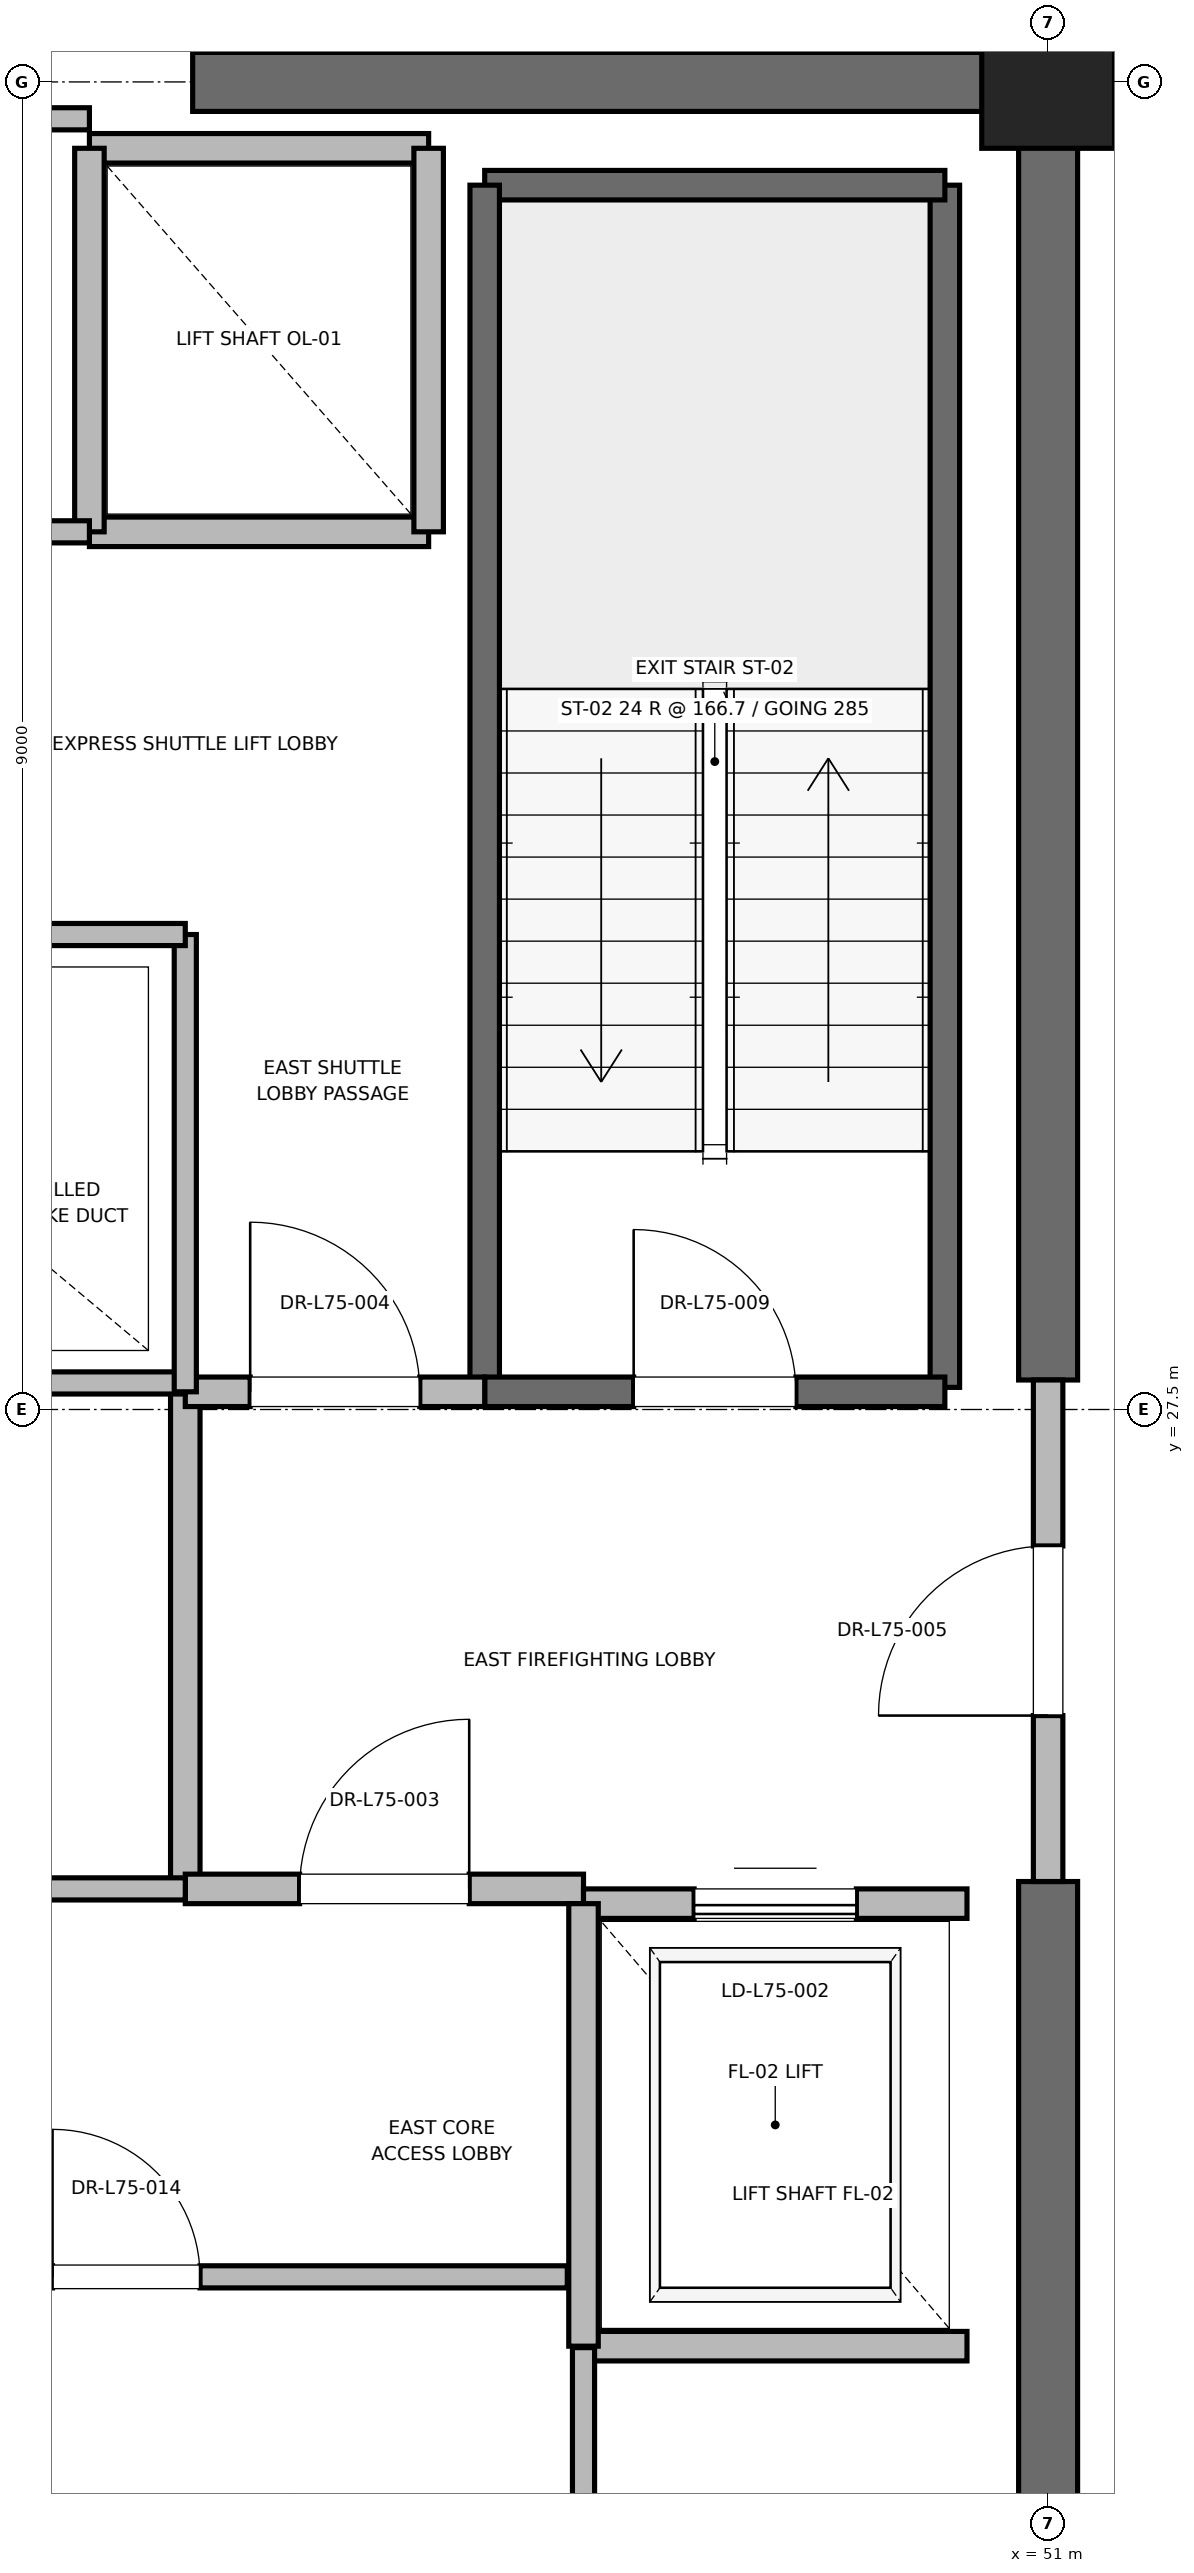
"""IFC4 building model, lengths in metres.
Left out: names, types, materials, properties, quantities, classifications, styles, units other than length and angle.
Written with IfcOpenShell. Run it as: python <this file> out.ifc"""

import sys

from ifc_helpers import new_model, si_unit, direction, frame, frame_2d, origin, origin_2d, place, context, subcontext, project, spatial, rectangle, extrude, element, fill, save


model = new_model("IFC4")
c1 = context("Model", 3, precision=1e-05, world=origin(), true_north=direction((0.0, 1.0)))
c2 = subcontext(c1, "Body", "Model", "MODEL_VIEW")
j1 = project(units=[si_unit("LENGTHUNIT", "METRE"), si_unit("PLANEANGLEUNIT", "RADIAN")], contexts=[c1])
p1 = place(None, origin())
s1 = spatial("IfcSite", under=j1, at=p1, CompositionType="ELEMENT")
p2 = place(p1, origin())
s2 = spatial("IfcBuilding", under=s1, at=p2, CompositionType="ELEMENT")
p3 = place(p2, frame((0.0, 0.0, 322.8)))
s3 = spatial("IfcBuildingStorey", under=s2, at=p3, CompositionType="ELEMENT", Elevation=322.8)
p4 = place(p3, frame((51.0, 36.5, 0.0), z_axis=(0.0, 0.0, 1.0), x_axis=(1.0, 0.0, 0.0)))
e1 = element("IfcColumn", 1, at=p4, inside=s3, PredefinedType="PILASTER", context=c2, shape_type="SweptSolid", body=[
    extrude(rectangle(XDim=0.9, YDim=0.9, at=origin_2d()), origin(), (0.0, 0.0, 1.0), 4.0),
])
for number, where, z_axis, x_axis in (
    (2, (45.2, 36.5, 0.0), (0.0, 0.0, 1.0), (1.0, 0.0, 0.0)),
    (3, (51.0, 18.5, 0.0), (0.0, 0.0, 1.0), (0.0, 1.0, 0.0)),
):
    element("IfcWall", number, at=place(p3, frame(where, z_axis=z_axis, x_axis=x_axis)), inside=s3, PredefinedType="SHEAR", context=c2, shape_type="SweptSolid", body=[
        extrude(rectangle(XDim=5.8, YDim=0.4, at=frame_2d((2.9, 0.0))), origin(), (0.0, 0.0, 1.0), 3.785),
    ])
p5 = place(p3, frame((51.0, 27.7, 0.0), z_axis=(0.0, 0.0, 1.0), x_axis=(0.0, 1.0, 0.0)))
e4 = element("IfcWall", 4, at=p5, inside=s3, PredefinedType="SHEAR", context=c2, shape_type="SweptSolid", body=[
    extrude(rectangle(XDim=8.8, YDim=0.4, at=frame_2d((4.4, 0.0))), origin(), (0.0, 0.0, 1.0), 3.785),
])
p6 = place(p3, frame((50.3, 27.65, 0.0), z_axis=(0.0, 0.0, 1.0), x_axis=(0.0, 1.0, 0.0)))
e5 = element("IfcWall", 5, at=p6, inside=s3, PredefinedType="SOLIDWALL", context=c2, shape_type="SweptSolid", body=[
    extrude(rectangle(XDim=8.15, YDim=0.2, at=frame_2d((4.075, 0.0))), origin(), (0.0, 0.0, 1.0), 3.785),
])
p7 = place(p3, frame((47.18, 35.8, 0.0), z_axis=(0.0, 0.0, 1.0), x_axis=(1.0, 0.0, 0.0)))
e6 = element("IfcWall", 6, at=p7, inside=s3, PredefinedType="SOLIDWALL", context=c2, shape_type="SweptSolid", body=[
    extrude(rectangle(XDim=3.12, YDim=0.2, at=frame_2d((1.56, 0.0))), origin(), (0.0, 0.0, 1.0), 3.785),
])
p8 = place(p3, frame((47.18, 27.62, 0.0), z_axis=(0.0, 0.0, 1.0), x_axis=(0.0, 1.0, 0.0)))
e7 = element("IfcWall", 7, at=p8, inside=s3, PredefinedType="SOLIDWALL", context=c2, shape_type="SweptSolid", body=[
    extrude(rectangle(XDim=8.18, YDim=0.2, at=frame_2d((4.09, 0.0))), origin(), (0.0, 0.0, 1.0), 3.785),
])
p9 = place(p3, frame((47.18, 27.62, 0.0), z_axis=(0.0, 0.0, 1.0), x_axis=(1.0, 0.0, 0.0)))
e8 = element("IfcWall", 8, at=p9, inside=s3, PredefinedType="SOLIDWALL", context=c2, shape_type="SweptSolid", body=[
    extrude(rectangle(XDim=3.12, YDim=0.2, at=frame_2d((1.56, 0.0))), origin(), (0.0, 0.0, 1.0), 3.785),
])
p10 = place(p9, frame((1.01, 0.0, 0.0)))
e9 = element("IfcOpeningElement", 9, at=p10, cuts=e8, PredefinedType="OPENING", context=c2, shape_type="SweptSolid", body=[
    extrude(rectangle(XDim=1.1, YDim=2.15, at=frame_2d((0.55, 1.075))), frame((0.0, 0.1, 0.0), z_axis=(0.0, -1.0, 0.0), x_axis=(1.0, 0.0, 0.0)), (0.0, 0.0, 1.0), 0.2),
])
p11 = place(p3, frame((45.15, 24.25, 0.0), z_axis=(0.0, 0.0, 1.0), x_axis=(0.0, 1.0, 0.0)))
e10 = element("IfcWall", 10, at=p11, inside=s3, PredefinedType="PARTITIONING", context=c2, shape_type="SweptSolid", body=[
    extrude(rectangle(XDim=3.37, YDim=0.2, at=frame_2d((1.685, 0.0))), origin(), (0.0, 0.0, 1.0), 3.785),
])
p12 = place(p3, frame((45.15, 24.25, 0.0), z_axis=(0.0, 0.0, 1.0), x_axis=(1.0, 0.0, 0.0)))
e11 = element("IfcWall", 11, at=p12, inside=s3, PredefinedType="PARTITIONING", context=c2, shape_type="SweptSolid", body=[
    extrude(rectangle(XDim=2.7, YDim=0.2, at=frame_2d((1.35, 0.0))), origin(), (0.0, 0.0, 1.0), 3.785),
])
p13 = place(p12, frame((0.775, 0.0, 0.0)))
e12 = element("IfcOpeningElement", 12, at=p13, cuts=e11, PredefinedType="OPENING", context=c2, shape_type="SweptSolid", body=[
    extrude(rectangle(XDim=1.15, YDim=2.2, at=frame_2d((0.575, 1.1))), frame((0.0, 0.1, 0.0), z_axis=(0.0, -1.0, 0.0), x_axis=(1.0, 0.0, 0.0)), (0.0, 0.0, 1.0), 0.2),
])
p14 = place(p3, frame((45.15, 27.62, 0.0), z_axis=(0.0, 0.0, 1.0), x_axis=(1.0, 0.0, 0.0)))
e13 = element("IfcWall", 13, at=p14, inside=s3, PredefinedType="PARTITIONING", context=c2, shape_type="SweptSolid", body=[
    extrude(rectangle(XDim=2.03, YDim=0.2, at=frame_2d((1.015, 0.0))), origin(), (0.0, 0.0, 1.0), 3.785),
])
p15 = place(p14, frame((0.44, 0.0, 0.0)))
e14 = element("IfcOpeningElement", 14, at=p15, cuts=e13, PredefinedType="OPENING", context=c2, shape_type="SweptSolid", body=[
    extrude(rectangle(XDim=1.15, YDim=2.2, at=frame_2d((0.575, 1.1))), frame((0.0, 0.1, 0.0), z_axis=(0.0, -1.0, 0.0), x_axis=(1.0, 0.0, 0.0)), (0.0, 0.0, 1.0), 0.2),
])
p16 = place(p3, frame((51.0, 24.3, 0.0), z_axis=(0.0, 0.0, 1.0), x_axis=(0.0, 1.0, 0.0)))
e15 = element("IfcWall", 15, at=p16, inside=s3, PredefinedType="PARTITIONING", context=c2, shape_type="SweptSolid", body=[
    extrude(rectangle(XDim=3.4, YDim=0.2, at=frame_2d((1.7, 0.0))), origin(), (0.0, 0.0, 1.0), 2.865),
])
p17 = place(p16, frame((1.125, 0.0, 0.0)))
e16 = element("IfcOpeningElement", 16, at=p17, cuts=e15, PredefinedType="OPENING", context=c2, shape_type="SweptSolid", body=[
    extrude(rectangle(XDim=1.15, YDim=2.2, at=frame_2d((0.575, 1.1))), frame((0.0, 0.1, 0.0), z_axis=(0.0, -1.0, 0.0), x_axis=(1.0, 0.0, 0.0)), (0.0, 0.0, 1.0), 0.2),
])
p18 = place(p3, frame((47.85, 21.15, 0.0), z_axis=(0.0, 0.0, 1.0), x_axis=(1.0, 0.0, 0.0)))
e17 = element("IfcWall", 17, at=p18, inside=s3, PredefinedType="SOLIDWALL", context=c2, shape_type="SweptSolid", body=[
    extrude(rectangle(XDim=2.6, YDim=0.2, at=frame_2d((1.3, 0.0))), origin(), (0.0, 0.0, 1.0), 3.785),
])
p19 = place(p3, frame((50.45, 24.15, 0.0), z_axis=(0.0, 0.0, 1.0), x_axis=(-1.0, 0.0, 0.0)))
e18 = element("IfcWall", 18, at=p19, inside=s3, PredefinedType="SOLIDWALL", context=c2, shape_type="SweptSolid", body=[
    extrude(rectangle(XDim=2.6, YDim=0.2, at=frame_2d((1.3, 0.0))), origin(), (0.0, 0.0, 1.0), 2.865),
])
p20 = place(p19, frame((0.75, 0.0, 0.0)))
e19 = element("IfcOpeningElement", 19, at=p20, cuts=e18, PredefinedType="OPENING", context=c2, shape_type="SweptSolid", body=[
    extrude(rectangle(XDim=1.1, YDim=2.2, at=frame_2d((0.55, 1.1))), frame((0.0, 0.1, 0.0), z_axis=(0.0, -1.0, 0.0), x_axis=(1.0, 0.0, 0.0)), (0.0, 0.0, 1.0), 0.2),
])
p21 = place(p3, frame((47.85, 24.15, 0.0), z_axis=(0.0, 0.0, 1.0), x_axis=(0.0, -1.0, 0.0)))
e20 = element("IfcWall", 20, at=p21, inside=s3, PredefinedType="SOLIDWALL", context=c2, shape_type="SweptSolid", body=[
    extrude(rectangle(XDim=3.0, YDim=0.2, at=frame_2d((1.5, 0.0))), origin(), (0.0, 0.0, 1.0), 3.785),
])
p22 = place(p3, frame((44.5, 33.45, 0.0), z_axis=(0.0, 0.0, 1.0), x_axis=(1.0, 0.0, 0.0)))
e21 = element("IfcWall", 21, at=p22, inside=s3, PredefinedType="SOLIDWALL", context=c2, shape_type="SweptSolid", body=[
    extrude(rectangle(XDim=2.3, YDim=0.2, at=frame_2d((1.15, 0.0))), origin(), (0.0, 0.0, 1.0), 3.785),
])
p23 = place(p3, frame((46.8, 36.05, 0.0), z_axis=(0.0, 0.0, 1.0), x_axis=(-1.0, 0.0, 0.0)))
e22 = element("IfcWall", 22, at=p23, inside=s3, PredefinedType="SOLIDWALL", context=c2, shape_type="SweptSolid", body=[
    extrude(rectangle(XDim=2.3, YDim=0.2, at=frame_2d((1.15, 0.0))), origin(), (0.0, 0.0, 1.0), 2.865),
])
p24 = place(p3, frame((44.5, 36.05, 0.0), z_axis=(0.0, 0.0, 1.0), x_axis=(0.0, -1.0, 0.0)))
e23 = element("IfcWall", 23, at=p24, inside=s3, PredefinedType="SOLIDWALL", context=c2, shape_type="SweptSolid", body=[
    extrude(rectangle(XDim=2.6, YDim=0.2, at=frame_2d((1.3, 0.0))), origin(), (0.0, 0.0, 1.0), 2.865),
])
p25 = place(p3, frame((46.8, 33.45, 0.0), z_axis=(0.0, 0.0, 1.0), x_axis=(0.0, 1.0, 0.0)))
e24 = element("IfcWall", 24, at=p25, inside=s3, PredefinedType="SOLIDWALL", context=c2, shape_type="SweptSolid", body=[
    extrude(rectangle(XDim=2.6, YDim=0.2, at=frame_2d((1.3, 0.0))), origin(), (0.0, 0.0, 1.0), 3.785),
])
p26 = place(p3, frame((41.56, 27.68, 0.0), z_axis=(0.0, 0.0, 1.0), x_axis=(1.0, 0.0, 0.0)))
e25 = element("IfcWall", 25, at=p26, inside=s3, PredefinedType="PARTITIONING", context=c2, shape_type="SweptSolid", body=[
    extrude(rectangle(XDim=3.59, YDim=0.15, at=frame_2d((1.795, 0.0))), origin(), (0.0, 0.0, 1.0), 2.85),
])
p27 = place(p3, frame((47.85, 18.6, 0.0), z_axis=(0.0, 0.0, 1.0), x_axis=(0.0, 1.0, 0.0)))
e26 = element("IfcWall", 26, at=p27, inside=s3, PredefinedType="PARTITIONING", context=c2, shape_type="SweptSolid", body=[
    extrude(rectangle(XDim=2.54, YDim=0.15, at=frame_2d((1.27, 0.0))), origin(), (0.0, 0.0, 1.0), 2.85),
])
p28 = place(p3, frame((41.76, 21.62, 0.0), z_axis=(0.0, 0.0, 1.0), x_axis=(1.0, 0.0, 0.0)))
e27 = element("IfcWall", 27, at=p28, inside=s3, PredefinedType="PARTITIONING", context=c2, shape_type="SweptSolid", body=[
    extrude(rectangle(XDim=5.98, YDim=0.15, at=frame_2d((2.99, 0.0))), origin(), (0.0, 0.0, 1.0), 2.85),
])
p29 = place(p28, frame((2.49, 0.0, 0.0)))
e28 = element("IfcOpeningElement", 28, at=p29, cuts=e27, PredefinedType="OPENING", context=c2, shape_type="SweptSolid", body=[
    extrude(rectangle(XDim=1.0, YDim=2.15, at=frame_2d((0.5, 1.075))), frame((0.0, 0.075, 0.0), z_axis=(0.0, -1.0, 0.0), x_axis=(1.0, 0.0, 0.0)), (0.0, 0.0, 1.0), 0.15),
])
p30 = place(p3, frame((41.76, 24.25, 0.0), z_axis=(0.0, 0.0, 1.0), x_axis=(1.0, 0.0, 0.0)))
e29 = element("IfcWall", 29, at=p30, inside=s3, PredefinedType="PARTITIONING", context=c2, shape_type="SweptSolid", body=[
    extrude(rectangle(XDim=3.39, YDim=0.15, at=frame_2d((1.695, 0.0))), origin(), (0.0, 0.0, 1.0), 2.85),
])
p31 = place(p30, frame((1.195, 0.0, 0.0)))
e30 = element("IfcOpeningElement", 30, at=p31, cuts=e29, PredefinedType="OPENING", context=c2, shape_type="SweptSolid", body=[
    extrude(rectangle(XDim=1.0, YDim=2.15, at=frame_2d((0.5, 1.075))), frame((0.0, 0.075, 0.0), z_axis=(0.0, -1.0, 0.0), x_axis=(1.0, 0.0, 0.0)), (0.0, 0.0, 1.0), 0.15),
])
p32 = place(p3, frame((45.15, 27.62, 0.0), z_axis=(0.0, 0.0, 1.0), x_axis=(0.0, 1.0, 0.0)))
e31 = element("IfcWall", 31, at=p32, inside=s3, PredefinedType="PARTITIONING", context=c2, shape_type="SweptSolid", body=[
    extrude(rectangle(XDim=3.1, YDim=0.15, at=frame_2d((1.55, 0.0))), origin(), (0.0, 0.0, 1.0), 2.85),
])
p33 = place(p3, frame((41.56, 30.72, 0.0), z_axis=(0.0, 0.0, 1.0), x_axis=(1.0, 0.0, 0.0)))
e32 = element("IfcWall", 32, at=p33, inside=s3, PredefinedType="PARTITIONING", context=c2, shape_type="SweptSolid", body=[
    extrude(rectangle(XDim=3.59, YDim=0.15, at=frame_2d((1.795, 0.0))), origin(), (0.0, 0.0, 1.0), 2.85),
])
p34 = place(p33, frame((1.355, 0.0, 0.0)))
e33 = element("IfcOpeningElement", 33, at=p34, cuts=e32, PredefinedType="OPENING", context=c2, shape_type="SweptSolid", body=[
    extrude(rectangle(XDim=0.88, YDim=2.1, at=frame_2d((0.44, 1.05))), frame((0.0, 0.075, 0.0), z_axis=(0.0, -1.0, 0.0), x_axis=(1.0, 0.0, 0.0)), (0.0, 0.0, 1.0), 0.15),
])
p35 = place(p3, frame((41.56, 36.25, 0.0), z_axis=(0.0, 0.0, 1.0), x_axis=(1.0, 0.0, 0.0)))
e34 = element("IfcWall", 34, at=p35, inside=s3, PredefinedType="PARTITIONING", context=c2, shape_type="SweptSolid", body=[
    extrude(rectangle(XDim=2.94, YDim=0.15, at=frame_2d((1.47, 0.0))), origin(), (0.0, 0.0, 1.0), 2.85),
])
p36 = place(p3, frame((41.56, 33.45, 0.0), z_axis=(0.0, 0.0, 1.0), x_axis=(1.0, 0.0, 0.0)))
e35 = element("IfcWall", 35, at=p36, inside=s3, PredefinedType="PARTITIONING", context=c2, shape_type="SweptSolid", body=[
    extrude(rectangle(XDim=2.94, YDim=0.15, at=frame_2d((1.47, 0.0))), origin(), (0.0, 0.0, 1.0), 2.85),
])
p37 = place(p36, frame((1.03, 0.0, 0.0)))
e36 = element("IfcOpeningElement", 36, at=p37, cuts=e35, PredefinedType="OPENING", context=c2, shape_type="SweptSolid", body=[
    extrude(rectangle(XDim=0.88, YDim=2.1, at=frame_2d((0.44, 1.05))), frame((0.0, 0.075, 0.0), z_axis=(0.0, -1.0, 0.0), x_axis=(1.0, 0.0, 0.0)), (0.0, 0.0, 1.0), 0.15),
])
p38 = place(p10, origin())
e37 = element("IfcDoor", 37, at=p38, inside=s3, OperationType="SINGLE_SWING_LEFT", PredefinedType="DOOR", context=c2, shape_type="SweptSolid", body=[
    extrude(rectangle(XDim=1.1, YDim=2.15, at=frame_2d((0.55, 1.075))), frame((0.0, 0.025, 0.0), z_axis=(0.0, -1.0, 0.0), x_axis=(1.0, 0.0, 0.0)), (0.0, 0.0, 1.0), 0.05),
])
fill(e9, e37)
p39 = place(p13, origin())
e38 = element("IfcDoor", 38, at=p39, inside=s3, OperationType="SINGLE_SWING_RIGHT", PredefinedType="DOOR", context=c2, shape_type="SweptSolid", body=[
    extrude(rectangle(XDim=1.15, YDim=2.2, at=frame_2d((0.575, 1.1))), frame((0.0, 0.025, 0.0), z_axis=(0.0, -1.0, 0.0), x_axis=(1.0, 0.0, 0.0)), (0.0, 0.0, 1.0), 0.05),
])
fill(e12, e38)
p40 = place(p15, origin())
e39 = element("IfcDoor", 39, at=p40, inside=s3, OperationType="SINGLE_SWING_LEFT", PredefinedType="DOOR", context=c2, shape_type="SweptSolid", body=[
    extrude(rectangle(XDim=1.15, YDim=2.2, at=frame_2d((0.575, 1.1))), frame((0.0, 0.025, 0.0), z_axis=(0.0, -1.0, 0.0), x_axis=(1.0, 0.0, 0.0)), (0.0, 0.0, 1.0), 0.05),
])
fill(e14, e39)
p41 = place(p17, origin())
e40 = element("IfcDoor", 40, at=p41, inside=s3, OperationType="SINGLE_SWING_LEFT", PredefinedType="DOOR", context=c2, shape_type="SweptSolid", body=[
    extrude(rectangle(XDim=1.15, YDim=2.2, at=frame_2d((0.575, 1.1))), frame((0.0, 0.025, 0.0), z_axis=(0.0, -1.0, 0.0), x_axis=(1.0, 0.0, 0.0)), (0.0, 0.0, 1.0), 0.05),
])
fill(e16, e40)
p42 = place(p20, origin())
e41 = element("IfcDoor", 41, at=p42, inside=s3, OperationType="SLIDING_TO_RIGHT", PredefinedType="DOOR", context=c2, shape_type="SweptSolid", body=[
    extrude(rectangle(XDim=1.1, YDim=2.2, at=frame_2d((0.55, 1.1))), frame((0.0, 0.025, 0.0), z_axis=(0.0, -1.0, 0.0), x_axis=(1.0, 0.0, 0.0)), (0.0, 0.0, 1.0), 0.05),
])
fill(e19, e41)
p43 = place(p29, origin())
e42 = element("IfcDoor", 42, at=p43, inside=s3, OperationType="SINGLE_SWING_LEFT", PredefinedType="DOOR", context=c2, shape_type="SweptSolid", body=[
    extrude(rectangle(XDim=1.0, YDim=2.15, at=frame_2d((0.5, 1.075))), frame((0.0, 0.025, 0.0), z_axis=(0.0, -1.0, 0.0), x_axis=(1.0, 0.0, 0.0)), (0.0, 0.0, 1.0), 0.05),
])
fill(e28, e42)
save(model, sys.argv[1])
